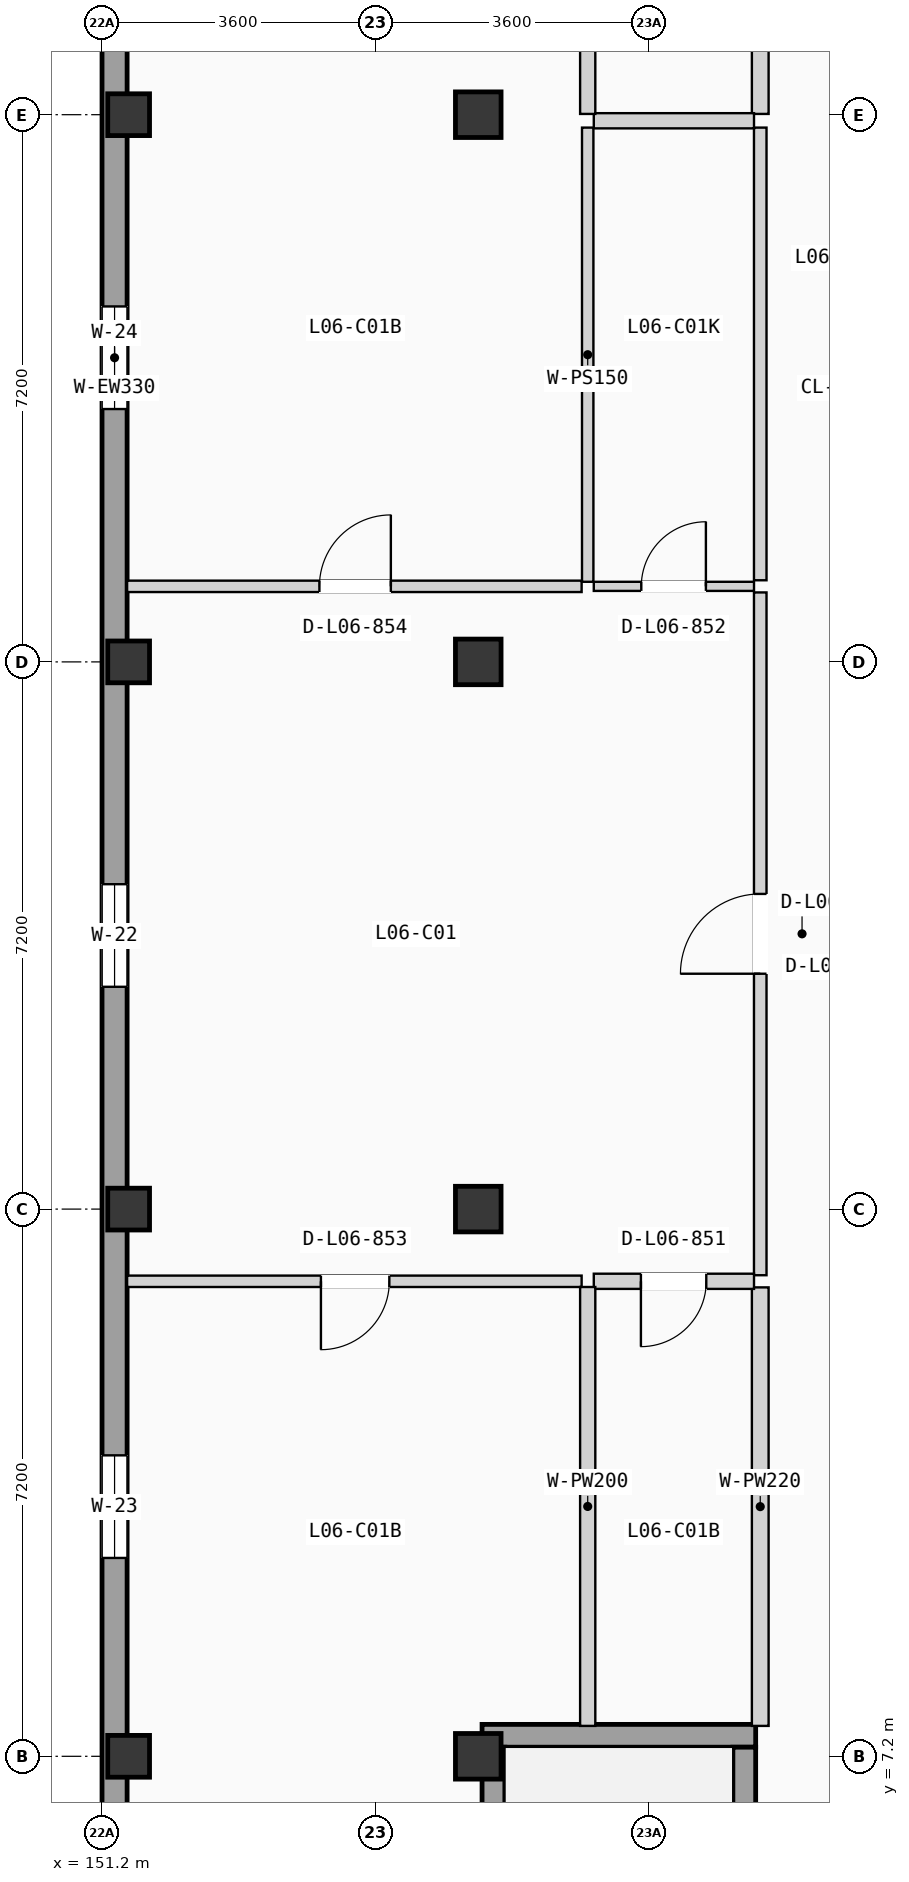
"""IFC4 building model, lengths in metres.
Left out: names, types, materials, properties, quantities, classifications, styles, units other than length and angle.
Written with IfcOpenShell. Run it as: python <this file> out.ifc"""

import sys

from ifc_helpers import new_model, si_unit, direction, frame, frame_2d, origin, origin_2d, place, context, subcontext, project, spatial, rectangle, extrude, element, fill, save


model = new_model("IFC4")
c1 = context("Model", 3, precision=1e-05, world=origin(), true_north=direction((0.0, 1.0)))
c2 = subcontext(c1, "Body", "Model", "MODEL_VIEW")
j1 = project(units=[si_unit("LENGTHUNIT", "METRE"), si_unit("PLANEANGLEUNIT", "RADIAN")], contexts=[c1])
p1 = place(None, origin())
s1 = spatial("IfcSite", under=j1, at=p1, CompositionType="ELEMENT")
p2 = place(p1, origin())
s2 = spatial("IfcBuilding", under=s1, at=p2, CompositionType="ELEMENT")
p3 = place(p2, frame((0.0, 0.0, 21.525)))
s3 = spatial("IfcBuildingStorey", under=s2, at=p3, CompositionType="ELEMENT", Elevation=21.525)
for number, where, z_axis, x_axis in (
    (1, (151.55, 7.2, 0.0), (0.0, 0.0, 1.0), (1.0, 0.0, 0.0)),
    (2, (151.55, 14.4, 0.0), (0.0, 0.0, 1.0), (1.0, 0.0, 0.0)),
    (3, (151.55, 21.6, 0.0), (0.0, 0.0, 1.0), (1.0, 0.0, 0.0)),
    (4, (151.55, 28.8, 0.0), (0.0, 0.0, 1.0), (1.0, 0.0, 0.0)),
):
    element("IfcColumn", number, at=place(p3, frame(where, z_axis=z_axis, x_axis=x_axis)), inside=s3, PredefinedType="COLUMN", context=c2, shape_type="SweptSolid", body=[
        extrude(rectangle(XDim=0.55, YDim=0.55, at=origin_2d()), origin(), (0.0, 0.0, 1.0), 3.15),
    ])
for number, where, z_axis, x_axis in (
    (5, (156.15, 7.2, 0.0), (0.0, 0.0, 1.0), (1.0, 0.0, 0.0)),
    (6, (156.15, 14.4, 0.0), (0.0, 0.0, 1.0), (1.0, 0.0, 0.0)),
    (7, (156.15, 21.6, 0.0), (0.0, 0.0, 1.0), (1.0, 0.0, 0.0)),
    (8, (156.15, 28.8, 0.0), (0.0, 0.0, 1.0), (1.0, 0.0, 0.0)),
):
    element("IfcColumn", number, at=place(p3, frame(where, z_axis=z_axis, x_axis=x_axis)), inside=s3, PredefinedType="COLUMN", context=c2, shape_type="SweptSolid", body=[
        extrude(rectangle(XDim=0.6, YDim=0.6, at=origin_2d()), origin(), (0.0, 0.0, 1.0), 3.15),
    ])
p4 = place(p3, frame((151.365, 0.33, 0.0), z_axis=(0.0, 0.0, 1.0), x_axis=(0.0, 1.0, 0.0)))
e9 = element("IfcWall", 9, at=p4, inside=s3, PredefinedType="SOLIDWALL", context=c2, shape_type="SweptSolid", body=[
    extrude(rectangle(XDim=49.74, YDim=0.33, at=frame_2d((24.87, 0.0))), origin(), (0.0, 0.0, 1.0), 2.89),
])
p5 = place(p4, frame((16.995, 0.0, 0.855)))
e10 = element("IfcOpeningElement", 10, at=p5, cuts=e9, PredefinedType="OPENING", context=c2, shape_type="SweptSolid", body=[
    extrude(rectangle(XDim=1.35, YDim=1.35, at=frame_2d((0.675, 0.675))), frame((0.0, 0.175, 0.0), z_axis=(0.0, -1.0, 0.0), x_axis=(1.0, 0.0, 0.0)), (0.0, 0.0, 1.0), 0.35),
])
p6 = place(p4, frame((9.48, 0.0, 0.705)))
e11 = element("IfcOpeningElement", 11, at=p6, cuts=e9, PredefinedType="OPENING", context=c2, shape_type="SweptSolid", body=[
    extrude(rectangle(XDim=1.35, YDim=1.5, at=frame_2d((0.675, 0.75))), frame((0.0, 0.175, 0.0), z_axis=(0.0, -1.0, 0.0), x_axis=(1.0, 0.0, 0.0)), (0.0, 0.0, 1.0), 0.35),
])
p7 = place(p4, frame((24.597, 0.0, 0.555)))
e12 = element("IfcOpeningElement", 12, at=p7, cuts=e9, PredefinedType="OPENING", context=c2, shape_type="SweptSolid", body=[
    extrude(rectangle(XDim=1.35, YDim=1.65, at=frame_2d((0.675, 0.825))), frame((0.0, 0.175, 0.0), z_axis=(0.0, -1.0, 0.0), x_axis=(1.0, 0.0, 0.0)), (0.0, 0.0, 1.0), 0.35),
])
p8 = place(p4, frame((33.673, 0.0, 0.85)))
e13 = element("IfcOpeningElement", 13, at=p8, cuts=e9, PredefinedType="OPENING", context=c2, shape_type="SweptSolid", body=[
    extrude(rectangle(XDim=0.95, YDim=1.2, at=frame_2d((0.475, 0.6))), frame((0.0, 0.175, 0.0), z_axis=(0.0, -1.0, 0.0), x_axis=(1.0, 0.0, 0.0)), (0.0, 0.0, 1.0), 0.35),
])
p9 = place(p4, frame((29.999, 0.0, 0.9)))
e14 = element("IfcOpeningElement", 14, at=p9, cuts=e9, PredefinedType="OPENING", context=c2, shape_type="SweptSolid", body=[
    extrude(rectangle(XDim=1.48, YDim=1.2, at=frame_2d((0.74, 0.6))), frame((0.0, 0.175, 0.0), z_axis=(0.0, -1.0, 0.0), x_axis=(1.0, 0.0, 0.0)), (0.0, 0.0, 1.0), 0.35),
])
p10 = place(p4, frame((39.601, 0.0, 0.855)))
e15 = element("IfcOpeningElement", 15, at=p10, cuts=e9, PredefinedType="OPENING", context=c2, shape_type="SweptSolid", body=[
    extrude(rectangle(XDim=1.48, YDim=1.35, at=frame_2d((0.74, 0.675))), frame((0.0, 0.175, 0.0), z_axis=(0.0, -1.0, 0.0), x_axis=(1.0, 0.0, 0.0)), (0.0, 0.0, 1.0), 0.35),
])
p11 = place(p3, frame((156.2, 7.47, 0.0), z_axis=(0.0, 0.0, 1.0), x_axis=(1.0, 0.0, 0.0)))
e16 = element("IfcWall", 16, at=p11, inside=s3, PredefinedType="SHEAR", context=c2, shape_type="SweptSolid", body=[
    extrude(rectangle(XDim=3.6, YDim=0.3, at=frame_2d((1.8, 0.0))), origin(), (0.0, 0.0, 1.0), 2.89),
])
p12 = place(p3, frame((156.35, 0.32, 0.0), z_axis=(0.0, 0.0, 1.0), x_axis=(0.0, 1.0, 0.0)))
e17 = element("IfcWall", 17, at=p12, inside=s3, PredefinedType="SHEAR", context=c2, shape_type="SweptSolid", body=[
    extrude(rectangle(XDim=7.0, YDim=0.3, at=frame_2d((3.5, 0.0))), origin(), (0.0, 0.0, 1.0), 2.89),
])
p13 = place(p3, frame((159.65, 0.32, 0.0), z_axis=(0.0, 0.0, 1.0), x_axis=(0.0, 1.0, 0.0)))
e18 = element("IfcWall", 18, at=p13, inside=s3, PredefinedType="SHEAR", context=c2, shape_type="SweptSolid", body=[
    extrude(rectangle(XDim=7.0, YDim=0.3, at=frame_2d((3.5, 0.0))), origin(), (0.0, 0.0, 1.0), 2.89),
])
p14 = place(p13, frame((0.225, 0.0, 0.0)))
e19 = element("IfcOpeningElement", 19, at=p14, cuts=e18, PredefinedType="OPENING", context=c2, shape_type="SweptSolid", body=[
    extrude(rectangle(XDim=1.15, YDim=2.12, at=frame_2d((0.575, 1.06))), frame((0.0, 0.16, 0.0), z_axis=(0.0, -1.0, 0.0), x_axis=(1.0, 0.0, 0.0)), (0.0, 0.0, 1.0), 0.32),
])
p15 = place(p3, frame((159.86, 13.53, 0.0), z_axis=(0.0, 0.0, 1.0), x_axis=(0.0, 1.0, 0.0)))
e20 = element("IfcWall", 20, at=p15, inside=s3, PredefinedType="PARTITIONING", context=c2, shape_type="SweptSolid", body=[
    extrude(rectangle(XDim=8.984, YDim=0.165, at=frame_2d((4.492, 0.0))), origin(), (0.0, 0.0, 1.0), 2.87),
])
p16 = place(p15, frame((3.967, 0.0, 0.0)))
e21 = element("IfcOpeningElement", 21, at=p16, cuts=e20, PredefinedType="OPENING", context=c2, shape_type="SweptSolid", body=[
    extrude(rectangle(XDim=1.05, YDim=2.13, at=frame_2d((0.525, 1.065))), frame((0.0, 0.093, 0.0), z_axis=(0.0, -1.0, 0.0), x_axis=(1.0, 0.0, 0.0)), (0.0, 0.0, 1.0), 0.185),
])
p17 = place(p3, frame((159.86, 7.6, 0.0), z_axis=(0.0, 0.0, 1.0), x_axis=(0.0, 1.0, 0.0)))
e22 = element("IfcWall", 22, at=p17, inside=s3, PredefinedType="PLUMBINGWALL", context=c2, shape_type="SweptSolid", body=[
    extrude(rectangle(XDim=5.77, YDim=0.22, at=frame_2d((2.885, 0.0))), origin(), (0.0, 0.0, 1.0), 2.87),
])
p18 = place(p3, frame((159.86, 22.674, 0.0), z_axis=(0.0, 0.0, 1.0), x_axis=(0.0, 1.0, 0.0)))
e23 = element("IfcWall", 23, at=p18, inside=s3, PredefinedType="PARTITIONING", context=c2, shape_type="SweptSolid", body=[
    extrude(rectangle(XDim=5.956, YDim=0.165, at=frame_2d((2.978, 0.0))), origin(), (0.0, 0.0, 1.0), 2.87),
])
p19 = place(p3, frame((159.86, 28.81, 0.0), z_axis=(0.0, 0.0, 1.0), x_axis=(0.0, 1.0, 0.0)))
e24 = element("IfcWall", 24, at=p19, inside=s3, PredefinedType="PLUMBINGWALL", context=c2, shape_type="SweptSolid", body=[
    extrude(rectangle(XDim=4.257, YDim=0.22, at=frame_2d((2.128, 0.0))), origin(), (0.0, 0.0, 1.0), 2.87),
])
p20 = place(p3, frame((157.67, 13.45, 0.0), z_axis=(0.0, 0.0, 1.0), x_axis=(1.0, 0.0, 0.0)))
e25 = element("IfcWall", 25, at=p20, inside=s3, PredefinedType="PLUMBINGWALL", context=c2, shape_type="SweptSolid", body=[
    extrude(rectangle(XDim=2.108, YDim=0.2, at=frame_2d((1.054, 0.0))), origin(), (0.0, 0.0, 1.0), 2.87),
])
p21 = place(p20, frame((0.62, 0.0, 0.0)))
e26 = element("IfcOpeningElement", 26, at=p21, cuts=e25, PredefinedType="OPENING", context=c2, shape_type="SweptSolid", body=[
    extrude(rectangle(XDim=0.86, YDim=2.0, at=frame_2d((0.43, 1.0))), frame((0.0, 0.11, 0.0), z_axis=(0.0, -1.0, 0.0), x_axis=(1.0, 0.0, 0.0)), (0.0, 0.0, 1.0), 0.22),
])
p22 = place(p3, frame((157.67, 22.594, 0.0), z_axis=(0.0, 0.0, 1.0), x_axis=(1.0, 0.0, 0.0)))
e27 = element("IfcWall", 27, at=p22, inside=s3, PredefinedType="PARTITIONING", context=c2, shape_type="SweptSolid", body=[
    extrude(rectangle(XDim=2.108, YDim=0.12, at=frame_2d((1.054, 0.0))), origin(), (0.0, 0.0, 1.0), 2.87),
])
p23 = place(p22, frame((0.625, 0.0, 0.0)))
e28 = element("IfcOpeningElement", 28, at=p23, cuts=e27, PredefinedType="OPENING", context=c2, shape_type="SweptSolid", body=[
    extrude(rectangle(XDim=0.85, YDim=2.01, at=frame_2d((0.425, 1.005))), frame((0.0, 0.07, 0.0), z_axis=(0.0, -1.0, 0.0), x_axis=(1.0, 0.0, 0.0)), (0.0, 0.0, 1.0), 0.14),
])
p24 = place(p3, frame((151.53, 13.45, 0.0), z_axis=(0.0, 0.0, 1.0), x_axis=(1.0, 0.0, 0.0)))
e29 = element("IfcWall", 29, at=p24, inside=s3, PredefinedType="PARTITIONING", context=c2, shape_type="SweptSolid", body=[
    extrude(rectangle(XDim=5.98, YDim=0.15, at=frame_2d((2.99, 0.0))), origin(), (0.0, 0.0, 1.0), 2.87),
])
p25 = place(p24, frame((2.55, 0.0, 0.0)))
e30 = element("IfcOpeningElement", 30, at=p25, cuts=e29, PredefinedType="OPENING", context=c2, shape_type="SweptSolid", body=[
    extrude(rectangle(XDim=0.9, YDim=2.04, at=frame_2d((0.45, 1.02))), frame((0.0, 0.085, 0.0), z_axis=(0.0, -1.0, 0.0), x_axis=(1.0, 0.0, 0.0)), (0.0, 0.0, 1.0), 0.17),
])
p26 = place(p3, frame((151.53, 22.594, 0.0), z_axis=(0.0, 0.0, 1.0), x_axis=(1.0, 0.0, 0.0)))
e31 = element("IfcWall", 31, at=p26, inside=s3, PredefinedType="PARTITIONING", context=c2, shape_type="SweptSolid", body=[
    extrude(rectangle(XDim=5.98, YDim=0.15, at=frame_2d((2.99, 0.0))), origin(), (0.0, 0.0, 1.0), 2.87),
])
p27 = place(p26, frame((2.53, 0.0, 0.0)))
e32 = element("IfcOpeningElement", 32, at=p27, cuts=e31, PredefinedType="OPENING", context=c2, shape_type="SweptSolid", body=[
    extrude(rectangle(XDim=0.94, YDim=2.06, at=frame_2d((0.47, 1.03))), frame((0.0, 0.085, 0.0), z_axis=(0.0, -1.0, 0.0), x_axis=(1.0, 0.0, 0.0)), (0.0, 0.0, 1.0), 0.17),
])
p28 = place(p3, frame((157.59, 7.6, 0.0), z_axis=(0.0, 0.0, 1.0), x_axis=(0.0, 1.0, 0.0)))
e33 = element("IfcWall", 33, at=p28, inside=s3, PredefinedType="PLUMBINGWALL", context=c2, shape_type="SweptSolid", body=[
    extrude(rectangle(XDim=5.775, YDim=0.2, at=frame_2d((2.887, 0.0))), origin(), (0.0, 0.0, 1.0), 2.87),
])
p29 = place(p3, frame((157.59, 22.654, 0.0), z_axis=(0.0, 0.0, 1.0), x_axis=(0.0, 1.0, 0.0)))
e34 = element("IfcWall", 34, at=p29, inside=s3, PredefinedType="PARTITIONING", context=c2, shape_type="SweptSolid", body=[
    extrude(rectangle(XDim=5.976, YDim=0.15, at=frame_2d((2.988, 0.0))), origin(), (0.0, 0.0, 1.0), 2.87),
])
p30 = place(p3, frame((157.67, 28.72, 0.0), z_axis=(0.0, 0.0, 1.0), x_axis=(1.0, 0.0, 0.0)))
e35 = element("IfcWall", 35, at=p30, inside=s3, PredefinedType="PLUMBINGWALL", context=c2, shape_type="SweptSolid", body=[
    extrude(rectangle(XDim=2.108, YDim=0.2, at=frame_2d((1.054, 0.0))), origin(), (0.0, 0.0, 1.0), 2.16),
])
p31 = place(p3, frame((157.59, 28.81, 0.0), z_axis=(0.0, 0.0, 1.0), x_axis=(0.0, 1.0, 0.0)))
e36 = element("IfcWall", 36, at=p31, inside=s3, PredefinedType="PLUMBINGWALL", context=c2, shape_type="SweptSolid", body=[
    extrude(rectangle(XDim=4.257, YDim=0.2, at=frame_2d((2.128, 0.0))), origin(), (0.0, 0.0, 1.0), 2.87),
])
p32 = place(p5, origin())
e37 = element("IfcWindow", 37, at=p32, inside=s3, PartitioningType="SINGLE_PANEL", PredefinedType="WINDOW", context=c2, shape_type="SweptSolid", body=[
    extrude(rectangle(XDim=1.35, YDim=1.35, at=frame_2d((0.675, 0.675))), frame((0.0, 0.03, 0.0), z_axis=(0.0, -1.0, 0.0), x_axis=(1.0, 0.0, 0.0)), (0.0, 0.0, 1.0), 0.06),
])
fill(e10, e37)
p33 = place(p6, origin())
e38 = element("IfcWindow", 38, at=p33, inside=s3, PartitioningType="SINGLE_PANEL", PredefinedType="WINDOW", context=c2, shape_type="SweptSolid", body=[
    extrude(rectangle(XDim=1.35, YDim=1.5, at=frame_2d((0.675, 0.75))), frame((0.0, 0.03, 0.0), z_axis=(0.0, -1.0, 0.0), x_axis=(1.0, 0.0, 0.0)), (0.0, 0.0, 1.0), 0.06),
])
fill(e11, e38)
p34 = place(p7, origin())
e39 = element("IfcWindow", 39, at=p34, inside=s3, PartitioningType="SINGLE_PANEL", PredefinedType="WINDOW", context=c2, shape_type="SweptSolid", body=[
    extrude(rectangle(XDim=1.35, YDim=1.65, at=frame_2d((0.675, 0.825))), frame((0.0, 0.03, 0.0), z_axis=(0.0, -1.0, 0.0), x_axis=(1.0, 0.0, 0.0)), (0.0, 0.0, 1.0), 0.06),
])
fill(e12, e39)
p35 = place(p16, origin())
e40 = element("IfcDoor", 40, at=p35, inside=s3, OperationType="SINGLE_SWING_LEFT", PredefinedType="DOOR", context=c2, shape_type="SweptSolid", body=[
    extrude(rectangle(XDim=1.05, YDim=2.13, at=frame_2d((0.525, 1.065))), frame((0.0, 0.025, 0.0), z_axis=(0.0, -1.0, 0.0), x_axis=(1.0, 0.0, 0.0)), (0.0, 0.0, 1.0), 0.05),
])
fill(e21, e40)
p36 = place(p21, frame((0.86, 0.0, 0.0), z_axis=(0.0, 0.0, 1.0), x_axis=(-1.0, 0.0, 0.0)))
e41 = element("IfcDoor", 41, at=p36, inside=s3, OperationType="SINGLE_SWING_LEFT", PredefinedType="DOOR", context=c2, shape_type="SweptSolid", body=[
    extrude(rectangle(XDim=0.86, YDim=2.0, at=frame_2d((0.43, 1.0))), frame((0.0, 0.025, 0.0), z_axis=(0.0, -1.0, 0.0), x_axis=(1.0, 0.0, 0.0)), (0.0, 0.0, 1.0), 0.05),
])
fill(e26, e41)
p37 = place(p23, origin())
e42 = element("IfcDoor", 42, at=p37, inside=s3, OperationType="SINGLE_SWING_RIGHT", PredefinedType="DOOR", context=c2, shape_type="SweptSolid", body=[
    extrude(rectangle(XDim=0.85, YDim=2.01, at=frame_2d((0.425, 1.005))), frame((0.0, 0.025, 0.0), z_axis=(0.0, -1.0, 0.0), x_axis=(1.0, 0.0, 0.0)), (0.0, 0.0, 1.0), 0.05),
])
fill(e28, e42)
p38 = place(p25, frame((0.9, 0.0, 0.0), z_axis=(0.0, 0.0, 1.0), x_axis=(-1.0, 0.0, 0.0)))
e43 = element("IfcDoor", 43, at=p38, inside=s3, OperationType="SINGLE_SWING_LEFT", PredefinedType="DOOR", context=c2, shape_type="SweptSolid", body=[
    extrude(rectangle(XDim=0.9, YDim=2.04, at=frame_2d((0.45, 1.02))), frame((0.0, 0.025, 0.0), z_axis=(0.0, -1.0, 0.0), x_axis=(1.0, 0.0, 0.0)), (0.0, 0.0, 1.0), 0.05),
])
fill(e30, e43)
p39 = place(p27, origin())
e44 = element("IfcDoor", 44, at=p39, inside=s3, OperationType="SINGLE_SWING_RIGHT", PredefinedType="DOOR", context=c2, shape_type="SweptSolid", body=[
    extrude(rectangle(XDim=0.94, YDim=2.06, at=frame_2d((0.47, 1.03))), frame((0.0, 0.025, 0.0), z_axis=(0.0, -1.0, 0.0), x_axis=(1.0, 0.0, 0.0)), (0.0, 0.0, 1.0), 0.05),
])
fill(e32, e44)
save(model, sys.argv[1])
